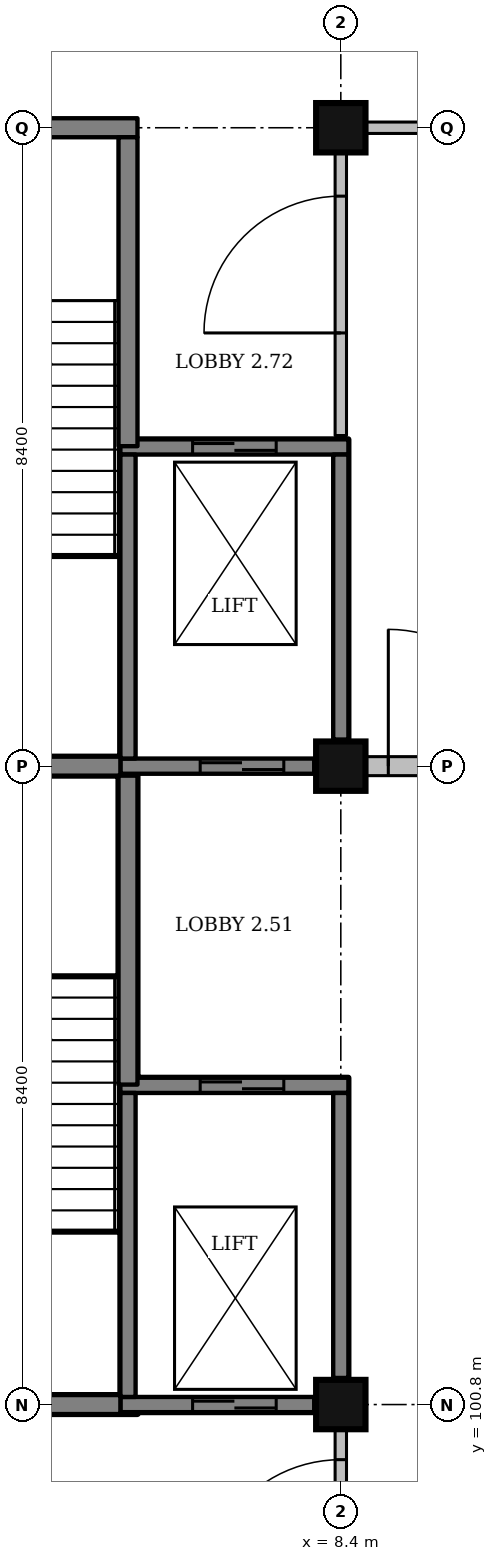
"""IFC4 building model, lengths in metres.
Left out: names, types, materials, properties, quantities, classifications, styles, units other than length and angle.
Written with IfcOpenShell. Run it as: python <this file> out.ifc"""

import sys

from ifc_helpers import new_model, si_unit, direction, frame, frame_2d, origin, origin_2d, place, context, subcontext, project, spatial, rectangle, extrude, element, fill, save


model = new_model("IFC4")
c1 = context("Model", 3, precision=1e-05, world=origin(), true_north=direction((0.0, 1.0)))
c2 = subcontext(c1, "Body", "Model", "MODEL_VIEW")
j1 = project(units=[si_unit("LENGTHUNIT", "METRE"), si_unit("PLANEANGLEUNIT", "RADIAN")], contexts=[c1])
p1 = place(None, origin())
s1 = spatial("IfcSite", under=j1, at=p1, CompositionType="ELEMENT")
p2 = place(p1, origin())
s2 = spatial("IfcBuilding", under=s1, at=p2, CompositionType="ELEMENT")
p3 = place(p2, frame((0.0, 0.0, 9.0)))
s3 = spatial("IfcBuildingStorey", under=s2, at=p3, CompositionType="ELEMENT", Elevation=9.0)
for number, where, z_axis, x_axis in (
    (1, (8.4, 100.8, 0.0), (0.0, 0.0, 1.0), (1.0, 0.0, 0.0)),
    (2, (8.4, 109.2, 0.0), (0.0, 0.0, 1.0), (1.0, 0.0, 0.0)),
):
    element("IfcColumn", number, at=place(p3, frame(where, z_axis=z_axis, x_axis=x_axis)), inside=s3, PredefinedType="COLUMN", context=c2, shape_type="SweptSolid", body=[
        extrude(rectangle(XDim=0.65, YDim=0.65, at=origin_2d()), origin(), (0.0, 0.0, 1.0), 4.5),
    ])
p4 = place(p3, frame((8.4, 117.6, -1.5), z_axis=(0.0, 0.0, 1.0), x_axis=(1.0, 0.0, 0.0)))
e3 = element("IfcColumn", 3, at=p4, inside=s3, PredefinedType="COLUMN", context=c2, shape_type="SweptSolid", body=[
    extrude(rectangle(XDim=0.65, YDim=0.65, at=origin_2d()), origin(), (0.0, 0.0, 1.0), 6.0),
])
p5 = place(p3, frame((5.5, 100.8, 0.0), z_axis=(0.0, 0.0, 1.0), x_axis=(1.0, 0.0, 0.0)))
e4 = element("IfcWall", 4, at=p5, inside=s3, PredefinedType="SHEAR", context=c2, shape_type="SweptSolid", body=[
    extrude(rectangle(XDim=2.55, YDim=0.2, at=frame_2d((1.275, 0.0))), origin(), (0.0, 0.0, 1.0), 4.5),
])
p6 = place(p5, frame((0.95, 0.0, 0.0)))
e5 = element("IfcOpeningElement", 5, at=p6, cuts=e4, PredefinedType="OPENING", context=c2, shape_type="SweptSolid", body=[
    extrude(rectangle(XDim=1.1, YDim=2.1, at=frame_2d((0.55, 1.05))), frame((0.0, 0.11, 0.0), z_axis=(0.0, -1.0, 0.0), x_axis=(1.0, 0.0, 0.0)), (0.0, 0.0, 1.0), 0.22),
])
p7 = place(p3, frame((5.5, 105.0, 0.0), z_axis=(0.0, 0.0, 1.0), x_axis=(1.0, 0.0, 0.0)))
e6 = element("IfcWall", 6, at=p7, inside=s3, PredefinedType="SHEAR", context=c2, shape_type="SweptSolid", body=[
    extrude(rectangle(XDim=3.0, YDim=0.2, at=frame_2d((1.5, 0.0))), origin(), (0.0, 0.0, 1.0), 4.5),
])
p8 = place(p7, frame((1.05, 0.0, 0.0)))
e7 = element("IfcOpeningElement", 7, at=p8, cuts=e6, PredefinedType="OPENING", context=c2, shape_type="SweptSolid", body=[
    extrude(rectangle(XDim=1.1, YDim=2.1, at=frame_2d((0.55, 1.05))), frame((0.0, 0.11, 0.0), z_axis=(0.0, -1.0, 0.0), x_axis=(1.0, 0.0, 0.0)), (0.0, 0.0, 1.0), 0.22),
])
p9 = place(p3, frame((5.6, 100.9, 0.0), z_axis=(0.0, 0.0, 1.0), x_axis=(0.0, 1.0, 0.0)))
e8 = element("IfcWall", 8, at=p9, inside=s3, PredefinedType="SHEAR", context=c2, shape_type="SweptSolid", body=[
    extrude(rectangle(XDim=4.0, YDim=0.2, at=frame_2d((2.0, 0.0))), origin(), (0.0, 0.0, 1.0), 4.5),
])
p10 = place(p3, frame((8.4, 101.15, 0.0), z_axis=(0.0, 0.0, 1.0), x_axis=(0.0, 1.0, 0.0)))
e9 = element("IfcWall", 9, at=p10, inside=s3, PredefinedType="SHEAR", context=c2, shape_type="SweptSolid", body=[
    extrude(rectangle(XDim=3.75, YDim=0.2, at=frame_2d((1.875, 0.0))), origin(), (0.0, 0.0, 1.0), 4.5),
])
p11 = place(p3, frame((5.5, 109.2, 0.0), z_axis=(0.0, 0.0, 1.0), x_axis=(1.0, 0.0, 0.0)))
e10 = element("IfcWall", 10, at=p11, inside=s3, PredefinedType="SHEAR", context=c2, shape_type="SweptSolid", body=[
    extrude(rectangle(XDim=2.55, YDim=0.2, at=frame_2d((1.275, 0.0))), origin(), (0.0, 0.0, 1.0), 4.5),
])
p12 = place(p11, frame((1.05, 0.0, 0.0)))
e11 = element("IfcOpeningElement", 11, at=p12, cuts=e10, PredefinedType="OPENING", context=c2, shape_type="SweptSolid", body=[
    extrude(rectangle(XDim=1.1, YDim=2.1, at=frame_2d((0.55, 1.05))), frame((0.0, 0.11, 0.0), z_axis=(0.0, -1.0, 0.0), x_axis=(1.0, 0.0, 0.0)), (0.0, 0.0, 1.0), 0.22),
])
p13 = place(p3, frame((5.5, 113.4, 0.0), z_axis=(0.0, 0.0, 1.0), x_axis=(1.0, 0.0, 0.0)))
e12 = element("IfcWall", 12, at=p13, inside=s3, PredefinedType="SHEAR", context=c2, shape_type="SweptSolid", body=[
    extrude(rectangle(XDim=3.0, YDim=0.2, at=frame_2d((1.5, 0.0))), origin(), (0.0, 0.0, 1.0), 4.5),
])
p14 = place(p13, frame((0.95, 0.0, 0.0)))
e13 = element("IfcOpeningElement", 13, at=p14, cuts=e12, PredefinedType="OPENING", context=c2, shape_type="SweptSolid", body=[
    extrude(rectangle(XDim=1.1, YDim=2.1, at=frame_2d((0.55, 1.05))), frame((0.0, 0.11, 0.0), z_axis=(0.0, -1.0, 0.0), x_axis=(1.0, 0.0, 0.0)), (0.0, 0.0, 1.0), 0.22),
])
p15 = place(p3, frame((5.6, 109.3, 0.0), z_axis=(0.0, 0.0, 1.0), x_axis=(0.0, 1.0, 0.0)))
e14 = element("IfcWall", 14, at=p15, inside=s3, PredefinedType="SHEAR", context=c2, shape_type="SweptSolid", body=[
    extrude(rectangle(XDim=4.0, YDim=0.2, at=frame_2d((2.0, 0.0))), origin(), (0.0, 0.0, 1.0), 4.5),
])
p16 = place(p3, frame((8.4, 109.55, 0.0), z_axis=(0.0, 0.0, 1.0), x_axis=(0.0, 1.0, 0.0)))
e15 = element("IfcWall", 15, at=p16, inside=s3, PredefinedType="SHEAR", context=c2, shape_type="SweptSolid", body=[
    extrude(rectangle(XDim=3.75, YDim=0.2, at=frame_2d((1.875, 0.0))), origin(), (0.0, 0.0, 1.0), 4.5),
])
p17 = place(p3, frame((0.25, 100.8, 0.0), z_axis=(0.0, 0.0, 1.0), x_axis=(1.0, 0.0, 0.0)))
e16 = element("IfcWall", 16, at=p17, inside=s3, PredefinedType="SHEAR", context=c2, shape_type="SweptSolid", body=[
    extrude(rectangle(XDim=5.25, YDim=0.25, at=frame_2d((2.625, 0.0))), origin(), (0.0, 0.0, 1.0), 4.5),
])
p18 = place(p17, frame((2.05, 0.0, 0.0)))
e17 = element("IfcOpeningElement", 17, at=p18, cuts=e16, PredefinedType="OPENING", context=c2, shape_type="SweptSolid", body=[
    extrude(rectangle(XDim=1.0, YDim=2.1, at=frame_2d((0.5, 1.05))), frame((0.0, 0.135, 0.0), z_axis=(0.0, -1.0, 0.0), x_axis=(1.0, 0.0, 0.0)), (0.0, 0.0, 1.0), 0.27),
])
p19 = place(p3, frame((0.25, 109.2, 0.0), z_axis=(0.0, 0.0, 1.0), x_axis=(1.0, 0.0, 0.0)))
e18 = element("IfcWall", 18, at=p19, inside=s3, PredefinedType="SHEAR", context=c2, shape_type="SweptSolid", body=[
    extrude(rectangle(XDim=5.25, YDim=0.25, at=frame_2d((2.625, 0.0))), origin(), (0.0, 0.0, 1.0), 4.5),
])
p20 = place(p3, frame((5.6, 105.01, 0.0), z_axis=(0.0, 0.0, 1.0), x_axis=(0.0, 1.0, 0.0)))
e19 = element("IfcWall", 19, at=p20, inside=s3, PredefinedType="SHEAR", context=c2, shape_type="SweptSolid", body=[
    extrude(rectangle(XDim=4.065, YDim=0.25, at=frame_2d((2.032, 0.0))), origin(), (0.0, 0.0, 1.0), 4.5),
])
p21 = place(p3, frame((0.225, 117.6, 0.0), z_axis=(0.0, 0.0, 1.0), x_axis=(1.0, 0.0, 0.0)))
e20 = element("IfcWall", 20, at=p21, inside=s3, PredefinedType="SHEAR", context=c2, shape_type="SweptSolid", body=[
    extrude(rectangle(XDim=5.5, YDim=0.25, at=frame_2d((2.75, 0.0))), origin(), (0.0, 0.0, 1.0), 4.5),
])
p22 = place(p21, frame((2.05, 0.0, 0.0)))
e21 = element("IfcOpeningElement", 21, at=p22, cuts=e20, PredefinedType="OPENING", context=c2, shape_type="SweptSolid", body=[
    extrude(rectangle(XDim=1.0, YDim=2.1, at=frame_2d((0.5, 1.05))), frame((0.0, 0.135, 0.0), z_axis=(0.0, -1.0, 0.0), x_axis=(1.0, 0.0, 0.0)), (0.0, 0.0, 1.0), 0.27),
])
p23 = place(p3, frame((5.6, 113.41, 0.0), z_axis=(0.0, 0.0, 1.0), x_axis=(0.0, 1.0, 0.0)))
e22 = element("IfcWall", 22, at=p23, inside=s3, PredefinedType="SHEAR", context=c2, shape_type="SweptSolid", body=[
    extrude(rectangle(XDim=4.065, YDim=0.25, at=frame_2d((2.033, 0.0))), origin(), (0.0, 0.0, 1.0), 4.5),
])
p24 = place(p3, frame((8.725, 109.2, 0.0), z_axis=(0.0, 0.0, 1.0), x_axis=(1.0, 0.0, 0.0)))
e23 = element("IfcWall", 23, at=p24, inside=s3, PredefinedType="SOLIDWALL", context=c2, shape_type="SweptSolid", body=[
    extrude(rectangle(XDim=7.75, YDim=0.25, at=frame_2d((3.875, 0.0))), origin(), (0.0, 0.0, 1.0), 4.15),
])
p25 = place(p24, frame((0.3, 0.0, 0.0)))
e24 = element("IfcOpeningElement", 24, at=p25, cuts=e23, PredefinedType="OPENING", context=c2, shape_type="SweptSolid", body=[
    extrude(rectangle(XDim=1.8, YDim=2.1, at=frame_2d((0.9, 1.05))), frame((0.0, 0.135, 0.0), z_axis=(0.0, -1.0, 0.0), x_axis=(1.0, 0.0, 0.0)), (0.0, 0.0, 1.0), 0.27),
])
p26 = place(p3, frame((8.725, 117.6, 0.0), z_axis=(0.0, 0.0, 1.0), x_axis=(1.0, 0.0, 0.0)))
e25 = element("IfcWall", 25, at=p26, inside=s3, PredefinedType="PARTITIONING", context=c2, shape_type="SweptSolid", body=[
    extrude(rectangle(XDim=7.75, YDim=0.15, at=frame_2d((3.875, 0.0))), origin(), (0.0, 0.0, 1.0), 3.4),
])
p27 = place(p3, frame((8.4, 92.725, 0.0), z_axis=(0.0, 0.0, 1.0), x_axis=(0.0, 1.0, 0.0)))
e26 = element("IfcWall", 26, at=p27, inside=s3, PredefinedType="PARTITIONING", context=c2, shape_type="SweptSolid", body=[
    extrude(rectangle(XDim=7.75, YDim=0.15, at=frame_2d((3.875, 0.0))), origin(), (0.0, 0.0, 1.0), 3.4),
])
p28 = place(p27, frame((5.55, 0.0, 0.0)))
e27 = element("IfcOpeningElement", 27, at=p28, cuts=e26, PredefinedType="OPENING", context=c2, shape_type="SweptSolid", body=[
    extrude(rectangle(XDim=1.8, YDim=2.1, at=frame_2d((0.9, 1.05))), frame((0.0, 0.085, 0.0), z_axis=(0.0, -1.0, 0.0), x_axis=(1.0, 0.0, 0.0)), (0.0, 0.0, 1.0), 0.17),
])
p29 = place(p3, frame((8.4, 113.55, 0.0), z_axis=(0.0, 0.0, 1.0), x_axis=(0.0, 1.0, 0.0)))
e28 = element("IfcWall", 28, at=p29, inside=s3, PredefinedType="PARTITIONING", context=c2, shape_type="SweptSolid", body=[
    extrude(rectangle(XDim=3.725, YDim=0.15, at=frame_2d((1.862, 0.0))), origin(), (0.0, 0.0, 1.0), 3.4),
])
p30 = place(p29, frame((1.35, 0.0, 0.0)))
e29 = element("IfcOpeningElement", 29, at=p30, cuts=e28, PredefinedType="OPENING", context=c2, shape_type="SweptSolid", body=[
    extrude(rectangle(XDim=1.8, YDim=2.1, at=frame_2d((0.9, 1.05))), frame((0.0, 0.085, 0.0), z_axis=(0.0, -1.0, 0.0), x_axis=(1.0, 0.0, 0.0)), (0.0, 0.0, 1.0), 0.17),
])
p31 = place(p28, origin())
e30 = element("IfcDoor", 30, at=p31, inside=s3, OperationType="DOUBLE_DOOR_SINGLE_SWING", PredefinedType="DOOR", context=c2, shape_type="SweptSolid", body=[
    extrude(rectangle(XDim=1.8, YDim=2.1, at=frame_2d((0.9, 1.05))), frame((0.0, 0.025, 0.0), z_axis=(0.0, -1.0, 0.0), x_axis=(1.0, 0.0, 0.0)), (0.0, 0.0, 1.0), 0.05),
])
fill(e27, e30)
p32 = place(p25, origin())
e31 = element("IfcDoor", 31, at=p32, inside=s3, OperationType="DOUBLE_DOOR_SINGLE_SWING", PredefinedType="DOOR", context=c2, shape_type="SweptSolid", body=[
    extrude(rectangle(XDim=1.8, YDim=2.1, at=frame_2d((0.9, 1.05))), frame((0.0, 0.025, 0.0), z_axis=(0.0, -1.0, 0.0), x_axis=(1.0, 0.0, 0.0)), (0.0, 0.0, 1.0), 0.05),
])
fill(e24, e31)
p33 = place(p30, origin())
e32 = element("IfcDoor", 32, at=p33, inside=s3, OperationType="DOUBLE_DOOR_SINGLE_SWING", PredefinedType="DOOR", context=c2, shape_type="SweptSolid", body=[
    extrude(rectangle(XDim=1.8, YDim=2.1, at=frame_2d((0.9, 1.05))), frame((0.0, 0.025, 0.0), z_axis=(0.0, -1.0, 0.0), x_axis=(1.0, 0.0, 0.0)), (0.0, 0.0, 1.0), 0.05),
])
fill(e29, e32)
p34 = place(p6, origin())
e33 = element("IfcDoor", 33, at=p34, inside=s3, OperationType="SLIDING_TO_RIGHT", PredefinedType="DOOR", context=c2, shape_type="SweptSolid", body=[
    extrude(rectangle(XDim=1.1, YDim=2.1, at=frame_2d((0.55, 1.05))), frame((0.0, 0.025, 0.0), z_axis=(0.0, -1.0, 0.0), x_axis=(1.0, 0.0, 0.0)), (0.0, 0.0, 1.0), 0.05),
])
fill(e5, e33)
p35 = place(p8, origin())
e34 = element("IfcDoor", 34, at=p35, inside=s3, OperationType="SLIDING_TO_LEFT", PredefinedType="DOOR", context=c2, shape_type="SweptSolid", body=[
    extrude(rectangle(XDim=1.1, YDim=2.1, at=frame_2d((0.55, 1.05))), frame((0.0, 0.025, 0.0), z_axis=(0.0, -1.0, 0.0), x_axis=(1.0, 0.0, 0.0)), (0.0, 0.0, 1.0), 0.05),
])
fill(e7, e34)
p36 = place(p12, origin())
e35 = element("IfcDoor", 35, at=p36, inside=s3, OperationType="SLIDING_TO_RIGHT", PredefinedType="DOOR", context=c2, shape_type="SweptSolid", body=[
    extrude(rectangle(XDim=1.1, YDim=2.1, at=frame_2d((0.55, 1.05))), frame((0.0, 0.025, 0.0), z_axis=(0.0, -1.0, 0.0), x_axis=(1.0, 0.0, 0.0)), (0.0, 0.0, 1.0), 0.05),
])
fill(e11, e35)
p37 = place(p14, origin())
e36 = element("IfcDoor", 36, at=p37, inside=s3, OperationType="SLIDING_TO_LEFT", PredefinedType="DOOR", context=c2, shape_type="SweptSolid", body=[
    extrude(rectangle(XDim=1.1, YDim=2.1, at=frame_2d((0.55, 1.05))), frame((0.0, 0.025, 0.0), z_axis=(0.0, -1.0, 0.0), x_axis=(1.0, 0.0, 0.0)), (0.0, 0.0, 1.0), 0.05),
])
fill(e13, e36)
save(model, sys.argv[1])
